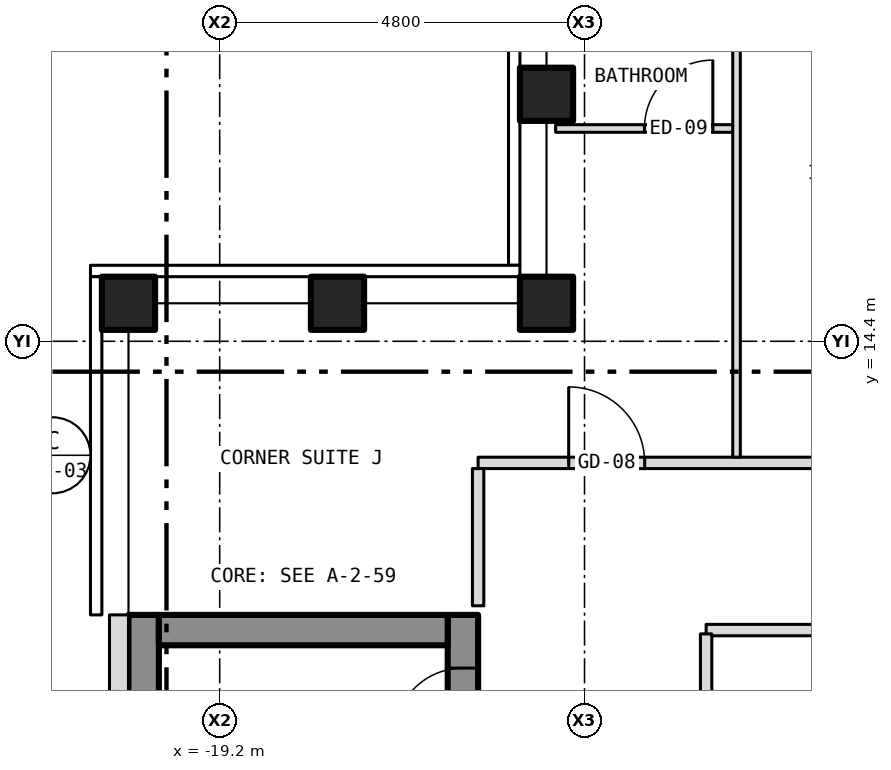
"""IFC4 building model, lengths in metres.
Left out: names, types, materials, properties, quantities, classifications, styles, units other than length and angle.
Written with IfcOpenShell. Run it as: python <this file> out.ifc"""

import sys

from ifc_helpers import new_model, si_unit, direction, frame, frame_2d, origin, origin_2d, place, context, subcontext, project, spatial, rectangle, hollow_rectangle, extrude, element, fill, save


model = new_model("IFC4")
c1 = context("Model", 3, precision=1e-05, world=origin(), true_north=direction((0.0, 1.0)))
c2 = subcontext(c1, "Body", "Model", "MODEL_VIEW")
j1 = project(units=[si_unit("LENGTHUNIT", "METRE"), si_unit("PLANEANGLEUNIT", "RADIAN")], contexts=[c1])
p1 = place(None, origin())
s1 = spatial("IfcSite", under=j1, at=p1, CompositionType="ELEMENT")
p2 = place(p1, origin())
s2 = spatial("IfcBuilding", under=s1, at=p2, CompositionType="ELEMENT")
p3 = place(p2, frame((0.0, 0.0, 215.5)))
s3 = spatial("IfcBuildingStorey", under=s2, at=p3, CompositionType="ELEMENT", Elevation=215.5)
for number, where, z_axis, x_axis in (
    (1, (-20.4, 14.9, -0.15), (0.0, 0.0, 1.0), (1.0, 0.0, 0.0)),
    (2, (-14.9, 14.9, -0.15), (0.0, 0.0, 1.0), (1.0, 0.0, 0.0)),
    (3, (-14.9, 17.65, -0.15), (0.0, 0.0, 1.0), (1.0, 0.0, 0.0)),
    (4, (-17.65, 14.9, -0.15), (0.0, 0.0, 1.0), (1.0, 0.0, 0.0)),
):
    element("IfcColumn", number, at=place(p3, frame(where, z_axis=z_axis, x_axis=x_axis)), inside=s3, PredefinedType="COLUMN", context=c2, shape_type="SweptSolid", body=[
        extrude(hollow_rectangle(XDim=0.7, YDim=0.7, WallThickness=0.04, at=origin_2d()), origin(), (0.0, 0.0, 1.0), 3.5),
    ])
p4 = place(p3, frame((-16.0, -10.8, 0.0), z_axis=(0.0, 0.0, 1.0), x_axis=(0.0, 1.0, 0.0)))
e5 = element("IfcWall", 5, at=p4, inside=s3, PredefinedType="SHEAR", context=c2, shape_type="SweptSolid", body=[
    extrude(rectangle(XDim=21.6, YDim=0.4, at=frame_2d((10.8, 0.0))), origin(), (0.0, 0.0, 1.0), 3.25),
])
p5 = place(p4, frame((9.4, 0.0, 0.0)))
e6 = element("IfcOpeningElement", 6, at=p5, cuts=e5, PredefinedType="OPENING", context=c2, shape_type="SweptSolid", body=[
    extrude(rectangle(XDim=1.1, YDim=2.1, at=frame_2d((0.55, 1.05))), frame((0.0, 0.212, 0.0), z_axis=(0.0, -1.0, 0.0), x_axis=(1.0, 0.0, 0.0)), (0.0, 0.0, 1.0), 0.424),
])
p6 = place(p4, frame((11.5, 0.0, 0.0)))
e7 = element("IfcOpeningElement", 7, at=p6, cuts=e5, PredefinedType="OPENING", context=c2, shape_type="SweptSolid", body=[
    extrude(rectangle(XDim=1.1, YDim=2.1, at=frame_2d((0.55, 1.05))), frame((0.0, 0.212, 0.0), z_axis=(0.0, -1.0, 0.0), x_axis=(1.0, 0.0, 0.0)), (0.0, 0.0, 1.0), 0.424),
])
p7 = place(p4, frame((13.6, 0.0, 0.0)))
e8 = element("IfcOpeningElement", 8, at=p7, cuts=e5, PredefinedType="OPENING", context=c2, shape_type="SweptSolid", body=[
    extrude(rectangle(XDim=1.1, YDim=2.1, at=frame_2d((0.55, 1.05))), frame((0.0, 0.212, 0.0), z_axis=(0.0, -1.0, 0.0), x_axis=(1.0, 0.0, 0.0)), (0.0, 0.0, 1.0), 0.424),
])
p8 = place(p4, frame((15.7, 0.0, 0.0)))
e9 = element("IfcOpeningElement", 9, at=p8, cuts=e5, PredefinedType="OPENING", context=c2, shape_type="SweptSolid", body=[
    extrude(rectangle(XDim=1.1, YDim=2.1, at=frame_2d((0.55, 1.05))), frame((0.0, 0.212, 0.0), z_axis=(0.0, -1.0, 0.0), x_axis=(1.0, 0.0, 0.0)), (0.0, 0.0, 1.0), 0.424),
])
p9 = place(p4, frame((17.8, 0.0, 0.0)))
e10 = element("IfcOpeningElement", 10, at=p9, cuts=e5, PredefinedType="OPENING", context=c2, shape_type="SweptSolid", body=[
    extrude(rectangle(XDim=1.1, YDim=2.1, at=frame_2d((0.55, 1.05))), frame((0.0, 0.212, 0.0), z_axis=(0.0, -1.0, 0.0), x_axis=(1.0, 0.0, 0.0)), (0.0, 0.0, 1.0), 0.424),
])
p10 = place(p4, frame((0.458, 0.0, 0.0)))
e11 = element("IfcOpeningElement", 11, at=p10, cuts=e5, PredefinedType="OPENING", context=c2, shape_type="SweptSolid", body=[
    extrude(rectangle(XDim=1.1, YDim=2.1, at=frame_2d((0.55, 1.05))), frame((0.0, 0.212, 0.0), z_axis=(0.0, -1.0, 0.0), x_axis=(1.0, 0.0, 0.0)), (0.0, 0.0, 1.0), 0.424),
])
p11 = place(p4, frame((7.5, 0.0, 0.0)))
e12 = element("IfcOpeningElement", 12, at=p11, cuts=e5, PredefinedType="OPENING", context=c2, shape_type="SweptSolid", body=[
    extrude(rectangle(XDim=1.1, YDim=2.1, at=frame_2d((0.55, 1.05))), frame((0.0, 0.212, 0.0), z_axis=(0.0, -1.0, 0.0), x_axis=(1.0, 0.0, 0.0)), (0.0, 0.0, 1.0), 0.424),
])
p12 = place(p4, frame((20.0, 0.0, 0.0)))
e13 = element("IfcOpeningElement", 13, at=p12, cuts=e5, PredefinedType="OPENING", context=c2, shape_type="SweptSolid", body=[
    extrude(rectangle(XDim=0.9, YDim=2.1, at=frame_2d((0.45, 1.05))), frame((0.0, 0.212, 0.0), z_axis=(0.0, -1.0, 0.0), x_axis=(1.0, 0.0, 0.0)), (0.0, 0.0, 1.0), 0.424),
])
p13 = place(p3, frame((-20.2, -10.8, 0.0), z_axis=(0.0, 0.0, 1.0), x_axis=(0.0, 1.0, 0.0)))
e14 = element("IfcWall", 14, at=p13, inside=s3, PredefinedType="SHEAR", context=c2, shape_type="SweptSolid", body=[
    extrude(rectangle(XDim=21.6, YDim=0.4, at=frame_2d((10.8, 0.0))), origin(), (0.0, 0.0, 1.0), 3.25),
])
p14 = place(p3, frame((-20.0, 10.6, 0.0), z_axis=(0.0, 0.0, 1.0), x_axis=(1.0, 0.0, 0.0)))
e15 = element("IfcWall", 15, at=p14, inside=s3, PredefinedType="SHEAR", context=c2, shape_type="SweptSolid", body=[
    extrude(rectangle(XDim=3.8, YDim=0.4, at=frame_2d((1.9, 0.0))), origin(), (0.0, 0.0, 1.0), 3.25),
])
p15 = place(p3, frame((-20.525, 10.8, 0.0), z_axis=(0.0, 0.0, 1.0), x_axis=(0.0, -1.0, 0.0)))
e16 = element("IfcWall", 16, at=p15, inside=s3, PredefinedType="SOLIDWALL", context=c2, shape_type="SweptSolid", body=[
    extrude(rectangle(XDim=21.6, YDim=0.25, at=frame_2d((10.8, 0.0))), origin(), (0.0, 0.0, 1.0), 3.5),
])
p16 = place(p15, frame((18.05, 0.0, 1.0)))
e17 = element("IfcOpeningElement", 17, at=p16, cuts=e16, PredefinedType="OPENING", context=c2, shape_type="SweptSolid", body=[
    extrude(rectangle(XDim=0.6, YDim=1.5, at=frame_2d((0.3, 0.75))), frame((0.0, 0.137, 0.0), z_axis=(0.0, -1.0, 0.0), x_axis=(1.0, 0.0, 0.0)), (0.0, 0.0, 1.0), 0.274),
])
p17 = place(p3, frame((-12.8, 10.6, 0.0), z_axis=(0.0, 0.0, 1.0), x_axis=(1.0, 0.0, 0.0)))
e18 = element("IfcWall", 18, at=p17, inside=s3, PredefinedType="PARTITIONING", context=c2, shape_type="SweptSolid", body=[
    extrude(rectangle(XDim=13.9, YDim=0.15, at=frame_2d((6.95, 0.0))), origin(), (0.0, 0.0, 1.0), 3.35),
])
p18 = place(p17, frame((8.1, 0.0, 0.0)))
e19 = element("IfcOpeningElement", 19, at=p18, cuts=e18, PredefinedType="OPENING", context=c2, shape_type="SweptSolid", body=[
    extrude(rectangle(XDim=0.9, YDim=2.1, at=frame_2d((0.45, 1.05))), frame((0.0, 0.087, 0.0), z_axis=(0.0, -1.0, 0.0), x_axis=(1.0, 0.0, 0.0)), (0.0, 0.0, 1.0), 0.174),
])
p19 = place(p3, frame((-15.8, 12.8, 0.0), z_axis=(0.0, 0.0, 1.0), x_axis=(1.0, 0.0, 0.0)))
e20 = element("IfcWall", 20, at=p19, inside=s3, PredefinedType="PARTITIONING", context=c2, shape_type="SweptSolid", body=[
    extrude(rectangle(XDim=31.6, YDim=0.15, at=frame_2d((15.8, 0.0))), origin(), (0.0, 0.0, 1.0), 3.35),
])
p20 = place(p19, frame((5.417, 0.0, 0.0)))
e21 = element("IfcOpeningElement", 21, at=p20, cuts=e20, PredefinedType="OPENING", context=c2, shape_type="SweptSolid", body=[
    extrude(rectangle(XDim=0.9, YDim=2.1, at=frame_2d((0.45, 1.05))), frame((0.0, 0.087, 0.0), z_axis=(0.0, -1.0, 0.0), x_axis=(1.0, 0.0, 0.0)), (0.0, 0.0, 1.0), 0.174),
])
p21 = place(p19, frame((10.384, 0.0, 0.0)))
e22 = element("IfcOpeningElement", 22, at=p21, cuts=e20, PredefinedType="OPENING", context=c2, shape_type="SweptSolid", body=[
    extrude(rectangle(XDim=0.9, YDim=2.1, at=frame_2d((0.45, 1.05))), frame((0.0, 0.087, 0.0), z_axis=(0.0, -1.0, 0.0), x_axis=(1.0, 0.0, 0.0)), (0.0, 0.0, 1.0), 0.174),
])
p22 = place(p19, frame((14.2, 0.0, 0.0)))
e23 = element("IfcOpeningElement", 23, at=p22, cuts=e20, PredefinedType="OPENING", context=c2, shape_type="SweptSolid", body=[
    extrude(rectangle(XDim=1.0, YDim=2.1, at=frame_2d((0.5, 1.05))), frame((0.0, 0.087, 0.0), z_axis=(0.0, -1.0, 0.0), x_axis=(1.0, 0.0, 0.0)), (0.0, 0.0, 1.0), 0.174),
])
p23 = place(p19, frame((19.166, 0.0, 0.0)))
e24 = element("IfcOpeningElement", 24, at=p23, cuts=e20, PredefinedType="OPENING", context=c2, shape_type="SweptSolid", body=[
    extrude(rectangle(XDim=1.0, YDim=2.1, at=frame_2d((0.5, 1.05))), frame((0.0, 0.087, 0.0), z_axis=(0.0, -1.0, 0.0), x_axis=(1.0, 0.0, 0.0)), (0.0, 0.0, 1.0), 0.174),
])
p24 = place(p19, frame((24.134, 0.0, 0.0)))
e25 = element("IfcOpeningElement", 25, at=p24, cuts=e20, PredefinedType="OPENING", context=c2, shape_type="SweptSolid", body=[
    extrude(rectangle(XDim=1.0, YDim=2.1, at=frame_2d((0.5, 1.05))), frame((0.0, 0.087, 0.0), z_axis=(0.0, -1.0, 0.0), x_axis=(1.0, 0.0, 0.0)), (0.0, 0.0, 1.0), 0.174),
])
p25 = place(p19, frame((1.192, 0.0, 0.0)))
e26 = element("IfcOpeningElement", 26, at=p25, cuts=e20, PredefinedType="OPENING", context=c2, shape_type="SweptSolid", body=[
    extrude(rectangle(XDim=1.0, YDim=2.1, at=frame_2d((0.5, 1.05))), frame((0.0, 0.087, 0.0), z_axis=(0.0, -1.0, 0.0), x_axis=(1.0, 0.0, 0.0)), (0.0, 0.0, 1.0), 0.174),
])
p26 = place(p19, frame((29.409, 0.0, 0.0)))
e27 = element("IfcOpeningElement", 27, at=p26, cuts=e20, PredefinedType="OPENING", context=c2, shape_type="SweptSolid", body=[
    extrude(rectangle(XDim=1.0, YDim=2.1, at=frame_2d((0.5, 1.05))), frame((0.0, 0.087, 0.0), z_axis=(0.0, -1.0, 0.0), x_axis=(1.0, 0.0, 0.0)), (0.0, 0.0, 1.0), 0.174),
])
p27 = place(p3, frame((-14.78, 17.2, 0.0), z_axis=(0.0, 0.0, 1.0), x_axis=(1.0, 0.0, 0.0)))
e28 = element("IfcWall", 28, at=p27, inside=s3, PredefinedType="PARTITIONING", context=c2, shape_type="SweptSolid", body=[
    extrude(rectangle(XDim=2.38, YDim=0.1, at=frame_2d((1.19, 0.0))), origin(), (0.0, 0.0, 1.0), 3.35),
])
p28 = place(p27, frame((1.168, 0.0, 0.0)))
e29 = element("IfcOpeningElement", 29, at=p28, cuts=e28, PredefinedType="OPENING", context=c2, shape_type="SweptSolid", body=[
    extrude(rectangle(XDim=0.9, YDim=2.1, at=frame_2d((0.45, 1.05))), frame((0.0, 0.062, 0.0), z_axis=(0.0, -1.0, 0.0), x_axis=(1.0, 0.0, 0.0)), (0.0, 0.0, 1.0), 0.124),
])
p29 = place(p3, frame((-15.8, 10.92, 0.0), z_axis=(0.0, 0.0, 1.0), x_axis=(0.0, 1.0, 0.0)))
e30 = element("IfcWall", 30, at=p29, inside=s3, PredefinedType="PARTITIONING", context=c2, shape_type="SweptSolid", body=[
    extrude(rectangle(XDim=1.805, YDim=0.15, at=frame_2d((0.903, 0.0))), origin(), (0.0, 0.0, 1.0), 3.35),
])
p30 = place(p3, frame((-12.8, 8.175, 0.0), z_axis=(0.0, 0.0, 1.0), x_axis=(0.0, 1.0, 0.0)))
e31 = element("IfcWall", 31, at=p30, inside=s3, PredefinedType="PARTITIONING", context=c2, shape_type="SweptSolid", body=[
    extrude(rectangle(XDim=2.375, YDim=0.15, at=frame_2d((1.188, 0.0))), origin(), (0.0, 0.0, 1.0), 3.35),
])
p31 = place(p3, frame((-12.4, 12.875, 0.0), z_axis=(0.0, 0.0, 1.0), x_axis=(0.0, 1.0, 0.0)))
e32 = element("IfcWall", 32, at=p31, inside=s3, PredefinedType="PARTITIONING", context=c2, shape_type="SweptSolid", body=[
    extrude(rectangle(XDim=7.905, YDim=0.1, at=frame_2d((3.953, 0.0))), origin(), (0.0, 0.0, 1.0), 3.35),
])
p32 = place(p12, origin())
e33 = element("IfcDoor", 33, at=p32, inside=s3, OperationType="SINGLE_SWING_LEFT", PredefinedType="DOOR", context=c2, shape_type="SweptSolid", body=[
    extrude(rectangle(XDim=0.9, YDim=2.1, at=frame_2d((0.45, 1.05))), frame((0.0, 0.025, 0.0), z_axis=(0.0, -1.0, 0.0), x_axis=(1.0, 0.0, 0.0)), (0.0, 0.0, 1.0), 0.05),
])
fill(e13, e33)
p33 = place(p28, origin())
e34 = element("IfcDoor", 34, at=p33, inside=s3, OperationType="SINGLE_SWING_RIGHT", PredefinedType="DOOR", context=c2, shape_type="SweptSolid", body=[
    extrude(rectangle(XDim=0.9, YDim=2.1, at=frame_2d((0.45, 1.05))), frame((0.0, 0.025, 0.0), z_axis=(0.0, -1.0, 0.0), x_axis=(1.0, 0.0, 0.0)), (0.0, 0.0, 1.0), 0.05),
])
fill(e29, e34)
p34 = place(p25, origin())
e35 = element("IfcDoor", 35, at=p34, inside=s3, OperationType="SINGLE_SWING_LEFT", PredefinedType="DOOR", context=c2, shape_type="SweptSolid", body=[
    extrude(rectangle(XDim=1.0, YDim=2.1, at=frame_2d((0.5, 1.05))), frame((0.0, 0.025, 0.0), z_axis=(0.0, -1.0, 0.0), x_axis=(1.0, 0.0, 0.0)), (0.0, 0.0, 1.0), 0.05),
])
fill(e26, e35)
save(model, sys.argv[1])
